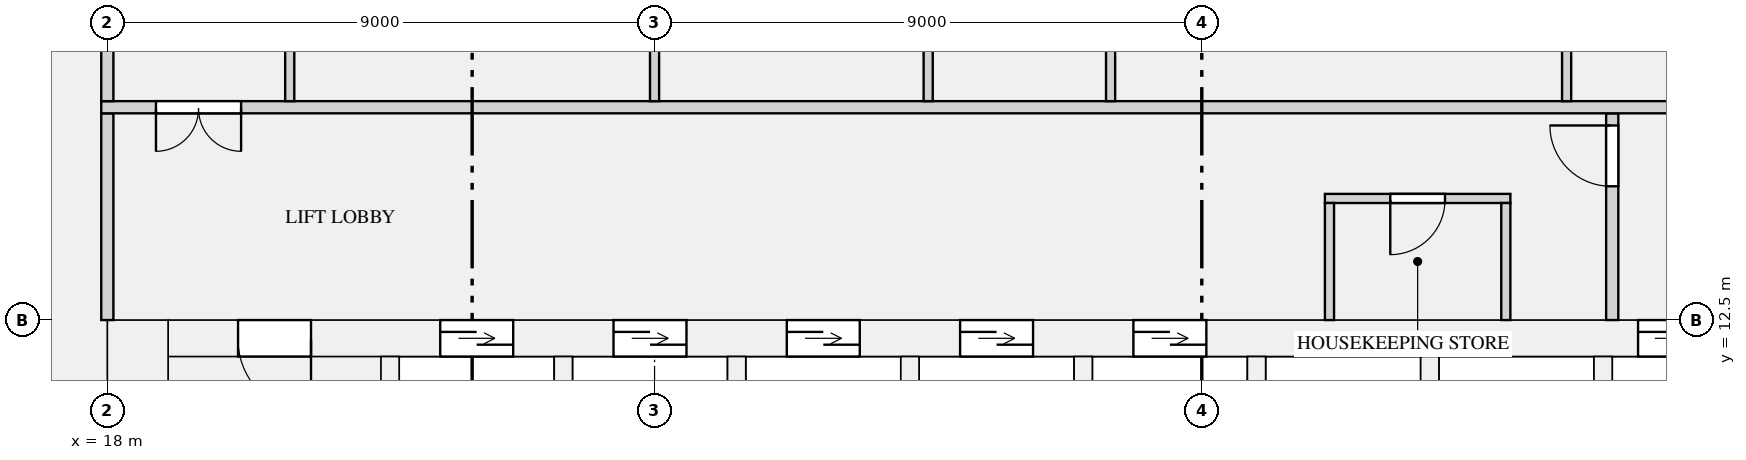
"""IFC4 building model, lengths in metres.
Left out: names, types, materials, properties, quantities, classifications, styles, units other than length and angle.
Written with IfcOpenShell. Run it as: python <this file> out.ifc"""

import sys

from ifc_helpers import new_model, si_unit, direction, frame, frame_2d, origin, place, context, subcontext, project, spatial, rectangle, extrude, element, fill, save


model = new_model("IFC4")
c1 = context("Model", 3, precision=1e-05, world=origin(), true_north=direction((0.0, 1.0)))
c2 = subcontext(c1, "Body", "Model", "MODEL_VIEW")
j1 = project(units=[si_unit("LENGTHUNIT", "METRE"), si_unit("PLANEANGLEUNIT", "RADIAN")], contexts=[c1])
p1 = place(None, origin())
s1 = spatial("IfcSite", under=j1, at=p1, CompositionType="ELEMENT")
p2 = place(p1, origin())
s2 = spatial("IfcBuilding", under=s1, at=p2, CompositionType="ELEMENT")
p3 = place(p2, frame((0.0, 0.0, 60.45)))
s3 = spatial("IfcBuildingStorey", under=s2, at=p3, CompositionType="ELEMENT", Elevation=60.45)
p4 = place(p3, frame((18.5, 0.0, 0.0), z_axis=(0.0, 0.0, 1.0), x_axis=(0.0, 1.0, 0.0)))
e1 = element("IfcWall", 1, at=p4, inside=s3, PredefinedType="SHEAR", context=c2, shape_type="SweptSolid", body=[
    extrude(rectangle(XDim=12.5, YDim=1.0, at=frame_2d((6.25, 0.0))), origin(), (0.0, 0.0, 1.0), 3.15),
])
p5 = place(p3, frame((19.0, 12.2, 0.0), z_axis=(0.0, 0.0, 1.0), x_axis=(1.0, 0.0, 0.0)))
e2 = element("IfcWall", 2, at=p5, inside=s3, PredefinedType="SHEAR", context=c2, shape_type="SweptSolid", body=[
    extrude(rectangle(XDim=34.0, YDim=0.6, at=frame_2d((17.0, 0.0))), origin(), (0.0, 0.0, 1.0), 3.15),
])
p6 = place(p5, frame((4.475, 0.0, 0.0)))
e3 = element("IfcOpeningElement", 3, at=p6, cuts=e2, PredefinedType="OPENING", context=c2, shape_type="SweptSolid", body=[
    extrude(rectangle(XDim=1.2, YDim=2.1, at=frame_2d((0.6, 1.05))), frame((0.0, 0.31, 0.0), z_axis=(0.0, -1.0, 0.0), x_axis=(1.0, 0.0, 0.0)), (0.0, 0.0, 1.0), 0.62),
])
p7 = place(p5, frame((7.325, 0.0, 0.0)))
e4 = element("IfcOpeningElement", 4, at=p7, cuts=e2, PredefinedType="OPENING", context=c2, shape_type="SweptSolid", body=[
    extrude(rectangle(XDim=1.2, YDim=2.1, at=frame_2d((0.6, 1.05))), frame((0.0, 0.31, 0.0), z_axis=(0.0, -1.0, 0.0), x_axis=(1.0, 0.0, 0.0)), (0.0, 0.0, 1.0), 0.62),
])
p8 = place(p5, frame((10.175, 0.0, 0.0)))
e5 = element("IfcOpeningElement", 5, at=p8, cuts=e2, PredefinedType="OPENING", context=c2, shape_type="SweptSolid", body=[
    extrude(rectangle(XDim=1.2, YDim=2.1, at=frame_2d((0.6, 1.05))), frame((0.0, 0.31, 0.0), z_axis=(0.0, -1.0, 0.0), x_axis=(1.0, 0.0, 0.0)), (0.0, 0.0, 1.0), 0.62),
])
p9 = place(p5, frame((13.025, 0.0, 0.0)))
e6 = element("IfcOpeningElement", 6, at=p9, cuts=e2, PredefinedType="OPENING", context=c2, shape_type="SweptSolid", body=[
    extrude(rectangle(XDim=1.2, YDim=2.1, at=frame_2d((0.6, 1.05))), frame((0.0, 0.31, 0.0), z_axis=(0.0, -1.0, 0.0), x_axis=(1.0, 0.0, 0.0)), (0.0, 0.0, 1.0), 0.62),
])
p10 = place(p5, frame((15.875, 0.0, 0.0)))
e7 = element("IfcOpeningElement", 7, at=p10, cuts=e2, PredefinedType="OPENING", context=c2, shape_type="SweptSolid", body=[
    extrude(rectangle(XDim=1.2, YDim=2.1, at=frame_2d((0.6, 1.05))), frame((0.0, 0.31, 0.0), z_axis=(0.0, -1.0, 0.0), x_axis=(1.0, 0.0, 0.0)), (0.0, 0.0, 1.0), 0.62),
])
p11 = place(p5, frame((24.175, 0.0, 0.0)))
e8 = element("IfcOpeningElement", 8, at=p11, cuts=e2, PredefinedType="OPENING", context=c2, shape_type="SweptSolid", body=[
    extrude(rectangle(XDim=1.1, YDim=2.1, at=frame_2d((0.55, 1.05))), frame((0.0, 0.31, 0.0), z_axis=(0.0, -1.0, 0.0), x_axis=(1.0, 0.0, 0.0)), (0.0, 0.0, 1.0), 0.62),
])
p12 = place(p5, frame((26.425, 0.0, 0.0)))
e9 = element("IfcOpeningElement", 9, at=p12, cuts=e2, PredefinedType="OPENING", context=c2, shape_type="SweptSolid", body=[
    extrude(rectangle(XDim=1.1, YDim=2.1, at=frame_2d((0.55, 1.05))), frame((0.0, 0.31, 0.0), z_axis=(0.0, -1.0, 0.0), x_axis=(1.0, 0.0, 0.0)), (0.0, 0.0, 1.0), 0.62),
])
p13 = place(p5, frame((28.675, 0.0, 0.0)))
e10 = element("IfcOpeningElement", 10, at=p13, cuts=e2, PredefinedType="OPENING", context=c2, shape_type="SweptSolid", body=[
    extrude(rectangle(XDim=1.1, YDim=2.1, at=frame_2d((0.55, 1.05))), frame((0.0, 0.31, 0.0), z_axis=(0.0, -1.0, 0.0), x_axis=(1.0, 0.0, 0.0)), (0.0, 0.0, 1.0), 0.62),
])
p14 = place(p5, frame((1.15, 0.0, 0.0)))
e11 = element("IfcOpeningElement", 11, at=p14, cuts=e2, PredefinedType="OPENING", context=c2, shape_type="SweptSolid", body=[
    extrude(rectangle(XDim=1.2, YDim=2.1, at=frame_2d((0.6, 1.05))), frame((0.0, 0.31, 0.0), z_axis=(0.0, -1.0, 0.0), x_axis=(1.0, 0.0, 0.0)), (0.0, 0.0, 1.0), 0.62),
])
p15 = place(p5, frame((31.65, 0.0, 0.0)))
e12 = element("IfcOpeningElement", 12, at=p15, cuts=e2, PredefinedType="OPENING", context=c2, shape_type="SweptSolid", body=[
    extrude(rectangle(XDim=1.2, YDim=2.1, at=frame_2d((0.6, 1.05))), frame((0.0, 0.31, 0.0), z_axis=(0.0, -1.0, 0.0), x_axis=(1.0, 0.0, 0.0)), (0.0, 0.0, 1.0), 0.62),
])
for number, where, z_axis, x_axis in (
    (13, (22.65, 9.35, 0.0), (0.0, 0.0, 1.0), (0.0, 1.0, 0.0)),
    (14, (25.5, 9.35, 0.0), (0.0, 0.0, 1.0), (0.0, 1.0, 0.0)),
    (15, (28.35, 9.35, 0.0), (0.0, 0.0, 1.0), (0.0, 1.0, 0.0)),
    (16, (31.2, 9.35, 0.0), (0.0, 0.0, 1.0), (0.0, 1.0, 0.0)),
    (17, (34.05, 9.35, 0.0), (0.0, 0.0, 1.0), (0.0, 1.0, 0.0)),
    (18, (36.9, 9.35, 0.0), (0.0, 0.0, 1.0), (0.0, 1.0, 0.0)),
    (19, (39.75, 9.35, 0.0), (0.0, 0.0, 1.0), (0.0, 1.0, 0.0)),
):
    element("IfcWall", number, at=place(p3, frame(where, z_axis=z_axis, x_axis=x_axis)), inside=s3, PredefinedType="SHEAR", context=c2, shape_type="SweptSolid", body=[
        extrude(rectangle(XDim=2.55, YDim=0.3, at=frame_2d((1.275, 0.0))), origin(), (0.0, 0.0, 1.0), 3.15),
    ])
p16 = place(p3, frame((42.6, 8.25, 0.0), z_axis=(0.0, 0.0, 1.0), x_axis=(0.0, 1.0, 0.0)))
e20 = element("IfcWall", 20, at=p16, inside=s3, PredefinedType="SHEAR", context=c2, shape_type="SweptSolid", body=[
    extrude(rectangle(XDim=3.65, YDim=0.3, at=frame_2d((1.825, 0.0))), origin(), (0.0, 0.0, 1.0), 3.15),
])
p17 = place(p3, frame((38.025, 14.5, 0.0), z_axis=(0.0, 0.0, 1.0), x_axis=(1.0, 0.0, 0.0)))
e21 = element("IfcWall", 21, at=p17, inside=s3, PredefinedType="PARTITIONING", context=c2, shape_type="SweptSolid", body=[
    extrude(rectangle(XDim=3.05, YDim=0.15, at=frame_2d((1.525, 0.0))), origin(), (0.0, 0.0, 1.0), 2.83),
])
p18 = place(p17, frame((1.075, 0.0, 0.0)))
e22 = element("IfcOpeningElement", 22, at=p18, cuts=e21, PredefinedType="OPENING", context=c2, shape_type="SweptSolid", body=[
    extrude(rectangle(XDim=0.9, YDim=2.1, at=frame_2d((0.45, 1.05))), frame((0.0, 0.085, 0.0), z_axis=(0.0, -1.0, 0.0), x_axis=(1.0, 0.0, 0.0)), (0.0, 0.0, 1.0), 0.17),
])
p19 = place(p3, frame((18.0, 12.5, 0.0), z_axis=(0.0, 0.0, 1.0), x_axis=(0.0, 1.0, 0.0)))
e23 = element("IfcWall", 23, at=p19, inside=s3, PredefinedType="PARTITIONING", context=c2, shape_type="SweptSolid", body=[
    extrude(rectangle(XDim=3.4, YDim=0.2, at=frame_2d((1.7, 0.0))), origin(), (0.0, 0.0, 1.0), 2.83),
])
for number, where, z_axis, x_axis in (
    (24, (38.1, 12.5, 0.0), (0.0, 0.0, 1.0), (0.0, 1.0, 0.0)),
    (25, (41.0, 12.5, 0.0), (0.0, 0.0, 1.0), (0.0, 1.0, 0.0)),
):
    element("IfcWall", number, at=place(p3, frame(where, z_axis=z_axis, x_axis=x_axis)), inside=s3, PredefinedType="PARTITIONING", context=c2, shape_type="SweptSolid", body=[
        extrude(rectangle(XDim=1.925, YDim=0.15, at=frame_2d((0.962, 0.0))), origin(), (0.0, 0.0, 1.0), 2.83),
    ])
p20 = place(p3, frame((42.75, 12.5, 0.0), z_axis=(0.0, 0.0, 1.0), x_axis=(0.0, 1.0, 0.0)))
e26 = element("IfcWall", 26, at=p20, inside=s3, PredefinedType="PARTITIONING", context=c2, shape_type="SweptSolid", body=[
    extrude(rectangle(XDim=3.4, YDim=0.2, at=frame_2d((1.7, 0.0))), origin(), (0.0, 0.0, 1.0), 2.83),
])
p21 = place(p20, frame((2.2, 0.0, 0.0)))
e27 = element("IfcOpeningElement", 27, at=p21, cuts=e26, PredefinedType="OPENING", context=c2, shape_type="SweptSolid", body=[
    extrude(rectangle(XDim=1.0, YDim=2.1, at=frame_2d((0.5, 1.05))), frame((0.0, 0.11, 0.0), z_axis=(0.0, -1.0, 0.0), x_axis=(1.0, 0.0, 0.0)), (0.0, 0.0, 1.0), 0.22),
])
p22 = place(p3, frame((17.9, 16.0, 0.0), z_axis=(0.0, 0.0, 1.0), x_axis=(1.0, 0.0, 0.0)))
e28 = element("IfcWall", 28, at=p22, inside=s3, PredefinedType="PARTITIONING", context=c2, shape_type="SweptSolid", body=[
    extrude(rectangle(XDim=36.2, YDim=0.2, at=frame_2d((18.1, 0.0))), origin(), (0.0, 0.0, 1.0), 2.83),
])
p23 = place(p22, frame((0.9, 0.0, 0.0)))
e29 = element("IfcOpeningElement", 29, at=p23, cuts=e28, PredefinedType="OPENING", context=c2, shape_type="SweptSolid", body=[
    extrude(rectangle(XDim=1.4, YDim=2.1, at=frame_2d((0.7, 1.05))), frame((0.0, 0.11, 0.0), z_axis=(0.0, -1.0, 0.0), x_axis=(1.0, 0.0, 0.0)), (0.0, 0.0, 1.0), 0.22),
])
p24 = place(p22, frame((33.9, 0.0, 0.0)))
e30 = element("IfcOpeningElement", 30, at=p24, cuts=e28, PredefinedType="OPENING", context=c2, shape_type="SweptSolid", body=[
    extrude(rectangle(XDim=1.4, YDim=2.1, at=frame_2d((0.7, 1.05))), frame((0.0, 0.11, 0.0), z_axis=(0.0, -1.0, 0.0), x_axis=(1.0, 0.0, 0.0)), (0.0, 0.0, 1.0), 0.22),
])
p25 = place(p3, frame((18.0, 16.1, 0.0), z_axis=(0.0, 0.0, 1.0), x_axis=(0.0, 1.0, 0.0)))
e31 = element("IfcWall", 31, at=p25, inside=s3, PredefinedType="PARTITIONING", context=c2, shape_type="SweptSolid", body=[
    extrude(rectangle(XDim=7.8, YDim=0.2, at=frame_2d((3.9, 0.0))), origin(), (0.0, 0.0, 1.0), 2.83),
])
p26 = place(p25, frame((1.35, 0.0, 0.0)))
e32 = element("IfcOpeningElement", 32, at=p26, cuts=e31, PredefinedType="OPENING", context=c2, shape_type="SweptSolid", body=[
    extrude(rectangle(XDim=1.1, YDim=2.1, at=frame_2d((0.55, 1.05))), frame((0.0, 0.11, 0.0), z_axis=(0.0, -1.0, 0.0), x_axis=(1.0, 0.0, 0.0)), (0.0, 0.0, 1.0), 0.22),
])
for number, where, z_axis, x_axis in (
    (33, (21.0, 16.1, 0.0), (0.0, 0.0, 1.0), (0.0, 1.0, 0.0)),
    (34, (27.0, 16.1, 0.0), (0.0, 0.0, 1.0), (0.0, 1.0, 0.0)),
    (35, (31.5, 16.1, 0.0), (0.0, 0.0, 1.0), (0.0, 1.0, 0.0)),
    (36, (34.5, 16.1, 0.0), (0.0, 0.0, 1.0), (0.0, 1.0, 0.0)),
    (37, (42.0, 16.1, 0.0), (0.0, 0.0, 1.0), (0.0, 1.0, 0.0)),
):
    element("IfcWall", number, at=place(p3, frame(where, z_axis=z_axis, x_axis=x_axis)), inside=s3, PredefinedType="PARTITIONING", context=c2, shape_type="SweptSolid", body=[
        extrude(rectangle(XDim=4.825, YDim=0.15, at=frame_2d((2.413, 0.0))), origin(), (0.0, 0.0, 1.0), 2.83),
    ])
p27 = place(p6, origin())
e38 = element("IfcDoor", 38, at=p27, inside=s3, OperationType="DOUBLE_DOOR_SLIDING", PredefinedType="DOOR", context=c2, shape_type="SweptSolid", body=[
    extrude(rectangle(XDim=1.2, YDim=2.1, at=frame_2d((0.6, 1.05))), frame((0.0, 0.025, 0.0), z_axis=(0.0, -1.0, 0.0), x_axis=(1.0, 0.0, 0.0)), (0.0, 0.0, 1.0), 0.05),
])
fill(e3, e38)
p28 = place(p7, origin())
e39 = element("IfcDoor", 39, at=p28, inside=s3, OperationType="DOUBLE_DOOR_SLIDING", PredefinedType="DOOR", context=c2, shape_type="SweptSolid", body=[
    extrude(rectangle(XDim=1.2, YDim=2.1, at=frame_2d((0.6, 1.05))), frame((0.0, 0.025, 0.0), z_axis=(0.0, -1.0, 0.0), x_axis=(1.0, 0.0, 0.0)), (0.0, 0.0, 1.0), 0.05),
])
fill(e4, e39)
p29 = place(p8, origin())
e40 = element("IfcDoor", 40, at=p29, inside=s3, OperationType="DOUBLE_DOOR_SLIDING", PredefinedType="DOOR", context=c2, shape_type="SweptSolid", body=[
    extrude(rectangle(XDim=1.2, YDim=2.1, at=frame_2d((0.6, 1.05))), frame((0.0, 0.025, 0.0), z_axis=(0.0, -1.0, 0.0), x_axis=(1.0, 0.0, 0.0)), (0.0, 0.0, 1.0), 0.05),
])
fill(e5, e40)
p30 = place(p9, origin())
e41 = element("IfcDoor", 41, at=p30, inside=s3, OperationType="DOUBLE_DOOR_SLIDING", PredefinedType="DOOR", context=c2, shape_type="SweptSolid", body=[
    extrude(rectangle(XDim=1.2, YDim=2.1, at=frame_2d((0.6, 1.05))), frame((0.0, 0.025, 0.0), z_axis=(0.0, -1.0, 0.0), x_axis=(1.0, 0.0, 0.0)), (0.0, 0.0, 1.0), 0.05),
])
fill(e6, e41)
p31 = place(p10, origin())
e42 = element("IfcDoor", 42, at=p31, inside=s3, OperationType="DOUBLE_DOOR_SLIDING", PredefinedType="DOOR", context=c2, shape_type="SweptSolid", body=[
    extrude(rectangle(XDim=1.2, YDim=2.1, at=frame_2d((0.6, 1.05))), frame((0.0, 0.025, 0.0), z_axis=(0.0, -1.0, 0.0), x_axis=(1.0, 0.0, 0.0)), (0.0, 0.0, 1.0), 0.05),
])
fill(e7, e42)
p32 = place(p11, origin())
e43 = element("IfcDoor", 43, at=p32, inside=s3, OperationType="DOUBLE_DOOR_SLIDING", PredefinedType="DOOR", context=c2, shape_type="SweptSolid", body=[
    extrude(rectangle(XDim=1.1, YDim=2.1, at=frame_2d((0.55, 1.05))), frame((0.0, 0.025, 0.0), z_axis=(0.0, -1.0, 0.0), x_axis=(1.0, 0.0, 0.0)), (0.0, 0.0, 1.0), 0.05),
])
fill(e8, e43)
p33 = place(p18, frame((0.9, 0.0, 0.0), z_axis=(0.0, 0.0, 1.0), x_axis=(-1.0, 0.0, 0.0)))
e44 = element("IfcDoor", 44, at=p33, inside=s3, OperationType="SINGLE_SWING_RIGHT", PredefinedType="DOOR", context=c2, shape_type="SweptSolid", body=[
    extrude(rectangle(XDim=0.9, YDim=2.1, at=frame_2d((0.45, 1.05))), frame((0.0, 0.025, 0.0), z_axis=(0.0, -1.0, 0.0), x_axis=(1.0, 0.0, 0.0)), (0.0, 0.0, 1.0), 0.05),
])
fill(e22, e44)
p34 = place(p14, frame((1.2, 0.0, 0.0), z_axis=(0.0, 0.0, 1.0), x_axis=(-1.0, 0.0, 0.0)))
e45 = element("IfcDoor", 45, at=p34, inside=s3, OperationType="SINGLE_SWING_LEFT", PredefinedType="DOOR", context=c2, shape_type="SweptSolid", body=[
    extrude(rectangle(XDim=1.2, YDim=2.1, at=frame_2d((0.6, 1.05))), frame((0.0, 0.025, 0.0), z_axis=(0.0, -1.0, 0.0), x_axis=(1.0, 0.0, 0.0)), (0.0, 0.0, 1.0), 0.05),
])
fill(e11, e45)
p35 = place(p21, origin())
e46 = element("IfcDoor", 46, at=p35, inside=s3, OperationType="SINGLE_SWING_RIGHT", PredefinedType="DOOR", context=c2, shape_type="SweptSolid", body=[
    extrude(rectangle(XDim=1.0, YDim=2.1, at=frame_2d((0.5, 1.05))), frame((0.0, 0.025, 0.0), z_axis=(0.0, -1.0, 0.0), x_axis=(1.0, 0.0, 0.0)), (0.0, 0.0, 1.0), 0.05),
])
fill(e27, e46)
p36 = place(p23, frame((1.4, 0.0, 0.0), z_axis=(0.0, 0.0, 1.0), x_axis=(-1.0, 0.0, 0.0)))
e47 = element("IfcDoor", 47, at=p36, inside=s3, OperationType="DOUBLE_DOOR_SINGLE_SWING", PredefinedType="DOOR", context=c2, shape_type="SweptSolid", body=[
    extrude(rectangle(XDim=1.4, YDim=2.1, at=frame_2d((0.7, 1.05))), frame((0.0, 0.025, 0.0), z_axis=(0.0, -1.0, 0.0), x_axis=(1.0, 0.0, 0.0)), (0.0, 0.0, 1.0), 0.05),
])
fill(e29, e47)
save(model, sys.argv[1])
